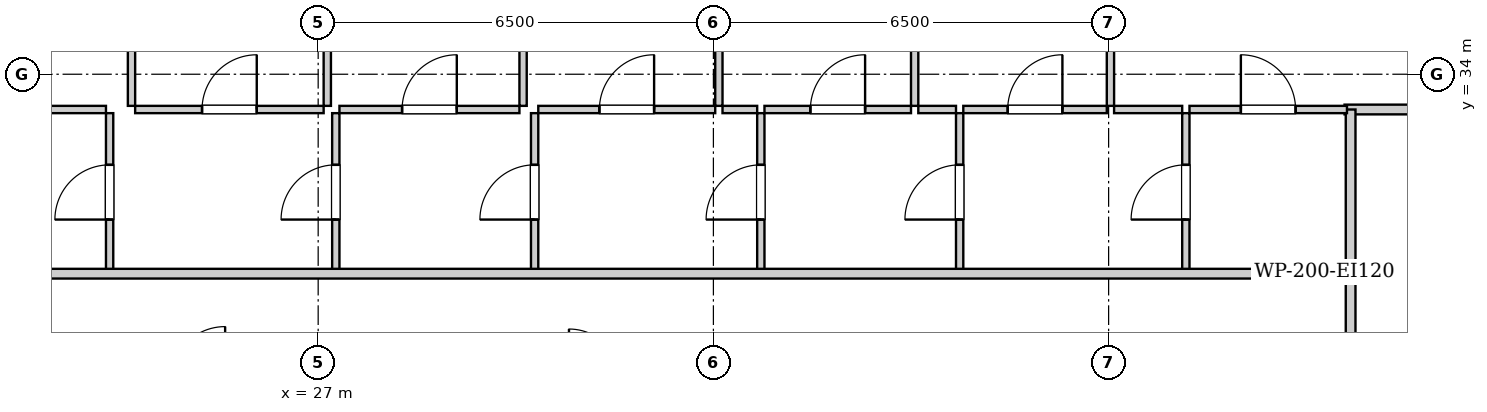
"""IFC4 building model, lengths in metres.
Left out: names, types, materials, properties, quantities, classifications, styles, units other than length and angle.
Written with IfcOpenShell. Run it as: python <this file> out.ifc"""

import sys

from ifc_helpers import new_model, si_unit, direction, frame, frame_2d, origin, place, context, subcontext, project, spatial, rectangle, extrude, element, fill, save


model = new_model("IFC4")
c1 = context("Model", 3, precision=1e-05, world=origin(), true_north=direction((0.0, 1.0)))
c2 = subcontext(c1, "Body", "Model", "MODEL_VIEW")
j1 = project(units=[si_unit("LENGTHUNIT", "METRE"), si_unit("PLANEANGLEUNIT", "RADIAN")], contexts=[c1])
p1 = place(None, origin())
s1 = spatial("IfcSite", under=j1, at=p1, CompositionType="ELEMENT")
p2 = place(p1, origin())
s2 = spatial("IfcBuilding", under=s1, at=p2, CompositionType="ELEMENT")
p3 = place(p2, frame((0.0, 0.0, 38.6)))
s3 = spatial("IfcBuildingStorey", under=s2, at=p3, CompositionType="ELEMENT", Elevation=38.6)
p4 = place(p3, frame((43.98, 28.98, 0.0), z_axis=(0.0, 0.0, 1.0), x_axis=(0.0, 1.0, 0.0)))
e1 = element("IfcWall", 1, at=p4, inside=s3, PredefinedType="PARTITIONING", context=c2, shape_type="SweptSolid", body=[
    extrude(rectangle(XDim=1.74, YDim=0.16, at=frame_2d((0.87, 0.0))), origin(), (0.0, 0.0, 1.0), 2.94),
])
p5 = place(p3, frame((43.88, 33.42, 0.0), z_axis=(0.0, 0.0, 1.0), x_axis=(1.0, 0.0, 0.0)))
e2 = element("IfcWall", 2, at=p5, inside=s3, PredefinedType="PARTITIONING", context=c2, shape_type="SweptSolid", body=[
    extrude(rectangle(XDim=2.34, YDim=0.16, at=frame_2d((1.17, 0.0))), origin(), (0.0, 0.0, 1.0), 2.94),
])
p6 = place(p3, frame((43.98, 30.76, 0.0), z_axis=(0.0, 0.0, 1.0), x_axis=(0.0, 1.0, 0.0)))
e3 = element("IfcWall", 3, at=p6, inside=s3, PredefinedType="PARTITIONING", context=c2, shape_type="SweptSolid", body=[
    extrude(rectangle(XDim=2.66, YDim=0.16, at=frame_2d((1.33, 0.0))), origin(), (0.0, 0.0, 1.0), 2.94),
])
p7 = place(p3, frame((23.57, 30.76, 0.0), z_axis=(0.0, 0.0, 1.0), x_axis=(0.0, 1.0, 0.0)))
e4 = element("IfcWall", 4, at=p7, inside=s3, PredefinedType="PARTITIONING", context=c2, shape_type="SweptSolid", body=[
    extrude(rectangle(XDim=2.6, YDim=0.12, at=frame_2d((1.3, 0.0))), origin(), (0.0, 0.0, 1.0), 2.94),
])
p8 = place(p7, frame((0.85, 0.0, 0.0)))
e5 = element("IfcOpeningElement", 5, at=p8, cuts=e4, PredefinedType="OPENING", context=c2, shape_type="SweptSolid", body=[
    extrude(rectangle(XDim=0.9, YDim=2.05, at=frame_2d((0.45, 1.025))), frame((0.0, 0.07, 0.0), z_axis=(0.0, -1.0, 0.0), x_axis=(1.0, 0.0, 0.0)), (0.0, 0.0, 1.0), 0.14),
])
p9 = place(p3, frame((20.77, 33.42, 0.0), z_axis=(0.0, 0.0, 1.0), x_axis=(1.0, 0.0, 0.0)))
e6 = element("IfcWall", 6, at=p9, inside=s3, PredefinedType="PARTITIONING", context=c2, shape_type="SweptSolid", body=[
    extrude(rectangle(XDim=2.74, YDim=0.12, at=frame_2d((1.37, 0.0))), origin(), (0.0, 0.0, 1.0), 2.94),
])
p10 = place(p9, frame((0.92, 0.0, 0.0)))
e7 = element("IfcOpeningElement", 7, at=p10, cuts=e6, PredefinedType="OPENING", context=c2, shape_type="SweptSolid", body=[
    extrude(rectangle(XDim=0.9, YDim=2.05, at=frame_2d((0.45, 1.025))), frame((0.0, 0.07, 0.0), z_axis=(0.0, -1.0, 0.0), x_axis=(1.0, 0.0, 0.0)), (0.0, 0.0, 1.0), 0.14),
])
p11 = place(p3, frame((27.29, 30.76, 0.0), z_axis=(0.0, 0.0, 1.0), x_axis=(0.0, 1.0, 0.0)))
e8 = element("IfcWall", 8, at=p11, inside=s3, PredefinedType="PARTITIONING", context=c2, shape_type="SweptSolid", body=[
    extrude(rectangle(XDim=2.6, YDim=0.12, at=frame_2d((1.3, 0.0))), origin(), (0.0, 0.0, 1.0), 2.94),
])
p12 = place(p11, frame((0.85, 0.0, 0.0)))
e9 = element("IfcOpeningElement", 9, at=p12, cuts=e8, PredefinedType="OPENING", context=c2, shape_type="SweptSolid", body=[
    extrude(rectangle(XDim=0.9, YDim=2.05, at=frame_2d((0.45, 1.025))), frame((0.0, 0.07, 0.0), z_axis=(0.0, -1.0, 0.0), x_axis=(1.0, 0.0, 0.0)), (0.0, 0.0, 1.0), 0.14),
])
p13 = place(p3, frame((23.99, 33.42, 0.0), z_axis=(0.0, 0.0, 1.0), x_axis=(1.0, 0.0, 0.0)))
e10 = element("IfcWall", 10, at=p13, inside=s3, PredefinedType="PARTITIONING", context=c2, shape_type="SweptSolid", body=[
    extrude(rectangle(XDim=3.1, YDim=0.12, at=frame_2d((1.55, 0.0))), origin(), (0.0, 0.0, 1.0), 2.94),
])
p14 = place(p13, frame((1.1, 0.0, 0.0)))
e11 = element("IfcOpeningElement", 11, at=p14, cuts=e10, PredefinedType="OPENING", context=c2, shape_type="SweptSolid", body=[
    extrude(rectangle(XDim=0.9, YDim=2.05, at=frame_2d((0.45, 1.025))), frame((0.0, 0.07, 0.0), z_axis=(0.0, -1.0, 0.0), x_axis=(1.0, 0.0, 0.0)), (0.0, 0.0, 1.0), 0.14),
])
p15 = place(p3, frame((30.56, 30.76, 0.0), z_axis=(0.0, 0.0, 1.0), x_axis=(0.0, 1.0, 0.0)))
e12 = element("IfcWall", 12, at=p15, inside=s3, PredefinedType="PARTITIONING", context=c2, shape_type="SweptSolid", body=[
    extrude(rectangle(XDim=2.6, YDim=0.12, at=frame_2d((1.3, 0.0))), origin(), (0.0, 0.0, 1.0), 2.94),
])
p16 = place(p15, frame((0.85, 0.0, 0.0)))
e13 = element("IfcOpeningElement", 13, at=p16, cuts=e12, PredefinedType="OPENING", context=c2, shape_type="SweptSolid", body=[
    extrude(rectangle(XDim=0.9, YDim=2.05, at=frame_2d((0.45, 1.025))), frame((0.0, 0.07, 0.0), z_axis=(0.0, -1.0, 0.0), x_axis=(1.0, 0.0, 0.0)), (0.0, 0.0, 1.0), 0.14),
])
p17 = place(p3, frame((27.35, 33.42, 0.0), z_axis=(0.0, 0.0, 1.0), x_axis=(1.0, 0.0, 0.0)))
e14 = element("IfcWall", 14, at=p17, inside=s3, PredefinedType="PARTITIONING", context=c2, shape_type="SweptSolid", body=[
    extrude(rectangle(XDim=2.96, YDim=0.12, at=frame_2d((1.48, 0.0))), origin(), (0.0, 0.0, 1.0), 2.94),
])
p18 = place(p17, frame((1.03, 0.0, 0.0)))
e15 = element("IfcOpeningElement", 15, at=p18, cuts=e14, PredefinedType="OPENING", context=c2, shape_type="SweptSolid", body=[
    extrude(rectangle(XDim=0.9, YDim=2.05, at=frame_2d((0.45, 1.025))), frame((0.0, 0.07, 0.0), z_axis=(0.0, -1.0, 0.0), x_axis=(1.0, 0.0, 0.0)), (0.0, 0.0, 1.0), 0.14),
])
p19 = place(p3, frame((34.28, 30.76, 0.0), z_axis=(0.0, 0.0, 1.0), x_axis=(0.0, 1.0, 0.0)))
e16 = element("IfcWall", 16, at=p19, inside=s3, PredefinedType="PARTITIONING", context=c2, shape_type="SweptSolid", body=[
    extrude(rectangle(XDim=2.6, YDim=0.12, at=frame_2d((1.3, 0.0))), origin(), (0.0, 0.0, 1.0), 2.94),
])
p20 = place(p19, frame((0.85, 0.0, 0.0)))
e17 = element("IfcOpeningElement", 17, at=p20, cuts=e16, PredefinedType="OPENING", context=c2, shape_type="SweptSolid", body=[
    extrude(rectangle(XDim=0.9, YDim=2.05, at=frame_2d((0.45, 1.025))), frame((0.0, 0.07, 0.0), z_axis=(0.0, -1.0, 0.0), x_axis=(1.0, 0.0, 0.0)), (0.0, 0.0, 1.0), 0.14),
])
p21 = place(p3, frame((30.62, 33.42, 0.0), z_axis=(0.0, 0.0, 1.0), x_axis=(1.0, 0.0, 0.0)))
e18 = element("IfcWall", 18, at=p21, inside=s3, PredefinedType="PARTITIONING", context=c2, shape_type="SweptSolid", body=[
    extrude(rectangle(XDim=2.91, YDim=0.12, at=frame_2d((1.455, 0.0))), origin(), (0.0, 0.0, 1.0), 2.94),
])
p22 = place(p21, frame((1.005, 0.0, 0.0)))
e19 = element("IfcOpeningElement", 19, at=p22, cuts=e18, PredefinedType="OPENING", context=c2, shape_type="SweptSolid", body=[
    extrude(rectangle(XDim=0.9, YDim=2.05, at=frame_2d((0.45, 1.025))), frame((0.0, 0.07, 0.0), z_axis=(0.0, -1.0, 0.0), x_axis=(1.0, 0.0, 0.0)), (0.0, 0.0, 1.0), 0.14),
])
p23 = place(p3, frame((33.65, 33.42, 0.0), z_axis=(0.0, 0.0, 1.0), x_axis=(1.0, 0.0, 0.0)))
e20 = element("IfcWall", 20, at=p23, inside=s3, PredefinedType="PARTITIONING", context=c2, shape_type="SweptSolid", body=[
    extrude(rectangle(XDim=0.57, YDim=0.12, at=frame_2d((0.285, 0.0))), origin(), (0.0, 0.0, 1.0), 2.94),
])
p24 = place(p3, frame((37.55, 30.76, 0.0), z_axis=(0.0, 0.0, 1.0), x_axis=(0.0, 1.0, 0.0)))
e21 = element("IfcWall", 21, at=p24, inside=s3, PredefinedType="PARTITIONING", context=c2, shape_type="SweptSolid", body=[
    extrude(rectangle(XDim=2.6, YDim=0.12, at=frame_2d((1.3, 0.0))), origin(), (0.0, 0.0, 1.0), 2.94),
])
p25 = place(p24, frame((0.85, 0.0, 0.0)))
e22 = element("IfcOpeningElement", 22, at=p25, cuts=e21, PredefinedType="OPENING", context=c2, shape_type="SweptSolid", body=[
    extrude(rectangle(XDim=0.9, YDim=2.05, at=frame_2d((0.45, 1.025))), frame((0.0, 0.07, 0.0), z_axis=(0.0, -1.0, 0.0), x_axis=(1.0, 0.0, 0.0)), (0.0, 0.0, 1.0), 0.14),
])
p26 = place(p3, frame((34.34, 33.42, 0.0), z_axis=(0.0, 0.0, 1.0), x_axis=(1.0, 0.0, 0.0)))
e23 = element("IfcWall", 23, at=p26, inside=s3, PredefinedType="PARTITIONING", context=c2, shape_type="SweptSolid", body=[
    extrude(rectangle(XDim=2.41, YDim=0.12, at=frame_2d((1.205, 0.0))), origin(), (0.0, 0.0, 1.0), 2.94),
])
p27 = place(p26, frame((0.755, 0.0, 0.0)))
e24 = element("IfcOpeningElement", 24, at=p27, cuts=e23, PredefinedType="OPENING", context=c2, shape_type="SweptSolid", body=[
    extrude(rectangle(XDim=0.9, YDim=2.05, at=frame_2d((0.45, 1.025))), frame((0.0, 0.07, 0.0), z_axis=(0.0, -1.0, 0.0), x_axis=(1.0, 0.0, 0.0)), (0.0, 0.0, 1.0), 0.14),
])
p28 = place(p3, frame((36.87, 33.42, 0.0), z_axis=(0.0, 0.0, 1.0), x_axis=(1.0, 0.0, 0.0)))
e25 = element("IfcWall", 25, at=p28, inside=s3, PredefinedType="PARTITIONING", context=c2, shape_type="SweptSolid", body=[
    extrude(rectangle(XDim=0.62, YDim=0.12, at=frame_2d((0.31, 0.0))), origin(), (0.0, 0.0, 1.0), 2.94),
])
p29 = place(p3, frame((41.27, 30.76, 0.0), z_axis=(0.0, 0.0, 1.0), x_axis=(0.0, 1.0, 0.0)))
e26 = element("IfcWall", 26, at=p29, inside=s3, PredefinedType="PARTITIONING", context=c2, shape_type="SweptSolid", body=[
    extrude(rectangle(XDim=2.6, YDim=0.12, at=frame_2d((1.3, 0.0))), origin(), (0.0, 0.0, 1.0), 2.94),
])
p30 = place(p29, frame((0.85, 0.0, 0.0)))
e27 = element("IfcOpeningElement", 27, at=p30, cuts=e26, PredefinedType="OPENING", context=c2, shape_type="SweptSolid", body=[
    extrude(rectangle(XDim=0.9, YDim=2.05, at=frame_2d((0.45, 1.025))), frame((0.0, 0.07, 0.0), z_axis=(0.0, -1.0, 0.0), x_axis=(1.0, 0.0, 0.0)), (0.0, 0.0, 1.0), 0.14),
])
p31 = place(p3, frame((37.61, 33.42, 0.0), z_axis=(0.0, 0.0, 1.0), x_axis=(1.0, 0.0, 0.0)))
e28 = element("IfcWall", 28, at=p31, inside=s3, PredefinedType="PARTITIONING", context=c2, shape_type="SweptSolid", body=[
    extrude(rectangle(XDim=2.36, YDim=0.12, at=frame_2d((1.18, 0.0))), origin(), (0.0, 0.0, 1.0), 2.94),
])
p32 = place(p31, frame((0.73, 0.0, 0.0)))
e29 = element("IfcOpeningElement", 29, at=p32, cuts=e28, PredefinedType="OPENING", context=c2, shape_type="SweptSolid", body=[
    extrude(rectangle(XDim=0.9, YDim=2.05, at=frame_2d((0.45, 1.025))), frame((0.0, 0.07, 0.0), z_axis=(0.0, -1.0, 0.0), x_axis=(1.0, 0.0, 0.0)), (0.0, 0.0, 1.0), 0.14),
])
p33 = place(p3, frame((40.09, 33.42, 0.0), z_axis=(0.0, 0.0, 1.0), x_axis=(1.0, 0.0, 0.0)))
e30 = element("IfcWall", 30, at=p33, inside=s3, PredefinedType="PARTITIONING", context=c2, shape_type="SweptSolid", body=[
    extrude(rectangle(XDim=1.12, YDim=0.12, at=frame_2d((0.56, 0.0))), origin(), (0.0, 0.0, 1.0), 2.94),
])
p34 = place(p3, frame((41.33, 33.42, 0.0), z_axis=(0.0, 0.0, 1.0), x_axis=(1.0, 0.0, 0.0)))
e31 = element("IfcWall", 31, at=p34, inside=s3, PredefinedType="PARTITIONING", context=c2, shape_type="SweptSolid", body=[
    extrude(rectangle(XDim=2.59, YDim=0.12, at=frame_2d((1.295, 0.0))), origin(), (0.0, 0.0, 1.0), 2.94),
])
p35 = place(p34, frame((0.845, 0.0, 0.0)))
e32 = element("IfcOpeningElement", 32, at=p35, cuts=e31, PredefinedType="OPENING", context=c2, shape_type="SweptSolid", body=[
    extrude(rectangle(XDim=0.9, YDim=2.05, at=frame_2d((0.45, 1.025))), frame((0.0, 0.07, 0.0), z_axis=(0.0, -1.0, 0.0), x_axis=(1.0, 0.0, 0.0)), (0.0, 0.0, 1.0), 0.14),
])
p36 = place(p3, frame((23.93, 33.48, 0.0), z_axis=(0.0, 0.0, 1.0), x_axis=(0.0, 1.0, 0.0)))
e33 = element("IfcWall", 33, at=p36, inside=s3, PredefinedType="PARTITIONING", context=c2, shape_type="SweptSolid", body=[
    extrude(rectangle(XDim=13.84, YDim=0.12, at=frame_2d((6.92, 0.0))), origin(), (0.0, 0.0, 1.0), 2.94),
])
p37 = place(p36, frame((6.455, 0.0, 0.0)))
e34 = element("IfcOpeningElement", 34, at=p37, cuts=e33, PredefinedType="OPENING", context=c2, shape_type="SweptSolid", body=[
    extrude(rectangle(XDim=0.9, YDim=2.05, at=frame_2d((0.45, 1.025))), frame((0.0, 0.07, 0.0), z_axis=(0.0, -1.0, 0.0), x_axis=(1.0, 0.0, 0.0)), (0.0, 0.0, 1.0), 0.14),
])
p38 = place(p3, frame((27.15, 33.48, 0.0), z_axis=(0.0, 0.0, 1.0), x_axis=(0.0, 1.0, 0.0)))
e35 = element("IfcWall", 35, at=p38, inside=s3, PredefinedType="PARTITIONING", context=c2, shape_type="SweptSolid", body=[
    extrude(rectangle(XDim=13.84, YDim=0.12, at=frame_2d((6.92, 0.0))), origin(), (0.0, 0.0, 1.0), 2.94),
])
p39 = place(p38, frame((6.455, 0.0, 0.0)))
e36 = element("IfcOpeningElement", 36, at=p39, cuts=e35, PredefinedType="OPENING", context=c2, shape_type="SweptSolid", body=[
    extrude(rectangle(XDim=0.9, YDim=2.05, at=frame_2d((0.45, 1.025))), frame((0.0, 0.07, 0.0), z_axis=(0.0, -1.0, 0.0), x_axis=(1.0, 0.0, 0.0)), (0.0, 0.0, 1.0), 0.14),
])
p40 = place(p3, frame((30.37, 33.48, 0.0), z_axis=(0.0, 0.0, 1.0), x_axis=(0.0, 1.0, 0.0)))
e37 = element("IfcWall", 37, at=p40, inside=s3, PredefinedType="PARTITIONING", context=c2, shape_type="SweptSolid", body=[
    extrude(rectangle(XDim=13.84, YDim=0.12, at=frame_2d((6.92, 0.0))), origin(), (0.0, 0.0, 1.0), 2.94),
])
p41 = place(p40, frame((6.455, 0.0, 0.0)))
e38 = element("IfcOpeningElement", 38, at=p41, cuts=e37, PredefinedType="OPENING", context=c2, shape_type="SweptSolid", body=[
    extrude(rectangle(XDim=0.9, YDim=2.05, at=frame_2d((0.45, 1.025))), frame((0.0, 0.07, 0.0), z_axis=(0.0, -1.0, 0.0), x_axis=(1.0, 0.0, 0.0)), (0.0, 0.0, 1.0), 0.14),
])
p42 = place(p3, frame((33.59, 33.48, 0.0), z_axis=(0.0, 0.0, 1.0), x_axis=(0.0, 1.0, 0.0)))
e39 = element("IfcWall", 39, at=p42, inside=s3, PredefinedType="PARTITIONING", context=c2, shape_type="SweptSolid", body=[
    extrude(rectangle(XDim=13.84, YDim=0.12, at=frame_2d((6.92, 0.0))), origin(), (0.0, 0.0, 1.0), 2.94),
])
p43 = place(p42, frame((6.455, 0.0, 0.0)))
e40 = element("IfcOpeningElement", 40, at=p43, cuts=e39, PredefinedType="OPENING", context=c2, shape_type="SweptSolid", body=[
    extrude(rectangle(XDim=0.9, YDim=2.05, at=frame_2d((0.45, 1.025))), frame((0.0, 0.07, 0.0), z_axis=(0.0, -1.0, 0.0), x_axis=(1.0, 0.0, 0.0)), (0.0, 0.0, 1.0), 0.14),
])
p44 = place(p3, frame((36.81, 33.48, 0.0), z_axis=(0.0, 0.0, 1.0), x_axis=(0.0, 1.0, 0.0)))
e41 = element("IfcWall", 41, at=p44, inside=s3, PredefinedType="PARTITIONING", context=c2, shape_type="SweptSolid", body=[
    extrude(rectangle(XDim=11.69, YDim=0.12, at=frame_2d((5.845, 0.0))), origin(), (0.0, 0.0, 1.0), 2.94),
])
p45 = place(p44, frame((5.395, 0.0, 0.0)))
e42 = element("IfcOpeningElement", 42, at=p45, cuts=e41, PredefinedType="OPENING", context=c2, shape_type="SweptSolid", body=[
    extrude(rectangle(XDim=0.9, YDim=2.05, at=frame_2d((0.45, 1.025))), frame((0.0, 0.07, 0.0), z_axis=(0.0, -1.0, 0.0), x_axis=(1.0, 0.0, 0.0)), (0.0, 0.0, 1.0), 0.14),
])
p46 = place(p3, frame((40.03, 33.48, 0.0), z_axis=(0.0, 0.0, 1.0), x_axis=(0.0, 1.0, 0.0)))
e43 = element("IfcWall", 43, at=p46, inside=s3, PredefinedType="PARTITIONING", context=c2, shape_type="SweptSolid", body=[
    extrude(rectangle(XDim=11.69, YDim=0.12, at=frame_2d((5.845, 0.0))), origin(), (0.0, 0.0, 1.0), 2.94),
])
p47 = place(p46, frame((5.395, 0.0, 0.0)))
e44 = element("IfcOpeningElement", 44, at=p47, cuts=e43, PredefinedType="OPENING", context=c2, shape_type="SweptSolid", body=[
    extrude(rectangle(XDim=0.9, YDim=2.05, at=frame_2d((0.45, 1.025))), frame((0.0, 0.07, 0.0), z_axis=(0.0, -1.0, 0.0), x_axis=(1.0, 0.0, 0.0)), (0.0, 0.0, 1.0), 0.14),
])
p48 = place(p3, frame((10.05, 30.72, 0.0), z_axis=(0.0, 0.0, 1.0), x_axis=(1.0, 0.0, 0.0)))
e45 = element("IfcWall", 45, at=p48, inside=s3, PredefinedType="PARTITIONING", context=c2, shape_type="SweptSolid", body=[
    extrude(rectangle(XDim=33.9, YDim=0.16, at=frame_2d((16.95, 0.0))), origin(), (0.0, 0.0, 1.0), 2.94),
])
p49 = place(p48, frame((4.035, 0.0, 0.0)))
e46 = element("IfcOpeningElement", 46, at=p49, cuts=e45, PredefinedType="OPENING", context=c2, shape_type="SweptSolid", body=[
    extrude(rectangle(XDim=0.95, YDim=2.1, at=frame_2d((0.475, 1.05))), frame((0.0, 0.09, 0.0), z_axis=(0.0, -1.0, 0.0), x_axis=(1.0, 0.0, 0.0)), (0.0, 0.0, 1.0), 0.18),
])
p50 = place(p8, origin())
e47 = element("IfcDoor", 47, at=p50, inside=s3, OperationType="SINGLE_SWING_LEFT", PredefinedType="DOOR", context=c2, shape_type="SweptSolid", body=[
    extrude(rectangle(XDim=0.9, YDim=2.05, at=frame_2d((0.45, 1.025))), frame((0.0, 0.025, 0.0), z_axis=(0.0, -1.0, 0.0), x_axis=(1.0, 0.0, 0.0)), (0.0, 0.0, 1.0), 0.05),
])
fill(e5, e47)
p51 = place(p12, origin())
e48 = element("IfcDoor", 48, at=p51, inside=s3, OperationType="SINGLE_SWING_LEFT", PredefinedType="DOOR", context=c2, shape_type="SweptSolid", body=[
    extrude(rectangle(XDim=0.9, YDim=2.05, at=frame_2d((0.45, 1.025))), frame((0.0, 0.025, 0.0), z_axis=(0.0, -1.0, 0.0), x_axis=(1.0, 0.0, 0.0)), (0.0, 0.0, 1.0), 0.05),
])
fill(e9, e48)
p52 = place(p14, origin())
e49 = element("IfcDoor", 49, at=p52, inside=s3, OperationType="SINGLE_SWING_RIGHT", PredefinedType="DOOR", context=c2, shape_type="SweptSolid", body=[
    extrude(rectangle(XDim=0.9, YDim=2.05, at=frame_2d((0.45, 1.025))), frame((0.0, 0.025, 0.0), z_axis=(0.0, -1.0, 0.0), x_axis=(1.0, 0.0, 0.0)), (0.0, 0.0, 1.0), 0.05),
])
fill(e11, e49)
p53 = place(p16, origin())
e50 = element("IfcDoor", 50, at=p53, inside=s3, OperationType="SINGLE_SWING_LEFT", PredefinedType="DOOR", context=c2, shape_type="SweptSolid", body=[
    extrude(rectangle(XDim=0.9, YDim=2.05, at=frame_2d((0.45, 1.025))), frame((0.0, 0.025, 0.0), z_axis=(0.0, -1.0, 0.0), x_axis=(1.0, 0.0, 0.0)), (0.0, 0.0, 1.0), 0.05),
])
fill(e13, e50)
p54 = place(p18, origin())
e51 = element("IfcDoor", 51, at=p54, inside=s3, OperationType="SINGLE_SWING_RIGHT", PredefinedType="DOOR", context=c2, shape_type="SweptSolid", body=[
    extrude(rectangle(XDim=0.9, YDim=2.05, at=frame_2d((0.45, 1.025))), frame((0.0, 0.025, 0.0), z_axis=(0.0, -1.0, 0.0), x_axis=(1.0, 0.0, 0.0)), (0.0, 0.0, 1.0), 0.05),
])
fill(e15, e51)
p55 = place(p20, origin())
e52 = element("IfcDoor", 52, at=p55, inside=s3, OperationType="SINGLE_SWING_LEFT", PredefinedType="DOOR", context=c2, shape_type="SweptSolid", body=[
    extrude(rectangle(XDim=0.9, YDim=2.05, at=frame_2d((0.45, 1.025))), frame((0.0, 0.025, 0.0), z_axis=(0.0, -1.0, 0.0), x_axis=(1.0, 0.0, 0.0)), (0.0, 0.0, 1.0), 0.05),
])
fill(e17, e52)
p56 = place(p22, origin())
e53 = element("IfcDoor", 53, at=p56, inside=s3, OperationType="SINGLE_SWING_RIGHT", PredefinedType="DOOR", context=c2, shape_type="SweptSolid", body=[
    extrude(rectangle(XDim=0.9, YDim=2.05, at=frame_2d((0.45, 1.025))), frame((0.0, 0.025, 0.0), z_axis=(0.0, -1.0, 0.0), x_axis=(1.0, 0.0, 0.0)), (0.0, 0.0, 1.0), 0.05),
])
fill(e19, e53)
p57 = place(p25, origin())
e54 = element("IfcDoor", 54, at=p57, inside=s3, OperationType="SINGLE_SWING_LEFT", PredefinedType="DOOR", context=c2, shape_type="SweptSolid", body=[
    extrude(rectangle(XDim=0.9, YDim=2.05, at=frame_2d((0.45, 1.025))), frame((0.0, 0.025, 0.0), z_axis=(0.0, -1.0, 0.0), x_axis=(1.0, 0.0, 0.0)), (0.0, 0.0, 1.0), 0.05),
])
fill(e22, e54)
p58 = place(p27, origin())
e55 = element("IfcDoor", 55, at=p58, inside=s3, OperationType="SINGLE_SWING_RIGHT", PredefinedType="DOOR", context=c2, shape_type="SweptSolid", body=[
    extrude(rectangle(XDim=0.9, YDim=2.05, at=frame_2d((0.45, 1.025))), frame((0.0, 0.025, 0.0), z_axis=(0.0, -1.0, 0.0), x_axis=(1.0, 0.0, 0.0)), (0.0, 0.0, 1.0), 0.05),
])
fill(e24, e55)
p59 = place(p30, origin())
e56 = element("IfcDoor", 56, at=p59, inside=s3, OperationType="SINGLE_SWING_LEFT", PredefinedType="DOOR", context=c2, shape_type="SweptSolid", body=[
    extrude(rectangle(XDim=0.9, YDim=2.05, at=frame_2d((0.45, 1.025))), frame((0.0, 0.025, 0.0), z_axis=(0.0, -1.0, 0.0), x_axis=(1.0, 0.0, 0.0)), (0.0, 0.0, 1.0), 0.05),
])
fill(e27, e56)
p60 = place(p32, origin())
e57 = element("IfcDoor", 57, at=p60, inside=s3, OperationType="SINGLE_SWING_RIGHT", PredefinedType="DOOR", context=c2, shape_type="SweptSolid", body=[
    extrude(rectangle(XDim=0.9, YDim=2.05, at=frame_2d((0.45, 1.025))), frame((0.0, 0.025, 0.0), z_axis=(0.0, -1.0, 0.0), x_axis=(1.0, 0.0, 0.0)), (0.0, 0.0, 1.0), 0.05),
])
fill(e29, e57)
p61 = place(p35, origin())
e58 = element("IfcDoor", 58, at=p61, inside=s3, OperationType="SINGLE_SWING_LEFT", PredefinedType="DOOR", context=c2, shape_type="SweptSolid", body=[
    extrude(rectangle(XDim=0.9, YDim=2.05, at=frame_2d((0.45, 1.025))), frame((0.0, 0.025, 0.0), z_axis=(0.0, -1.0, 0.0), x_axis=(1.0, 0.0, 0.0)), (0.0, 0.0, 1.0), 0.05),
])
fill(e32, e58)
save(model, sys.argv[1])
